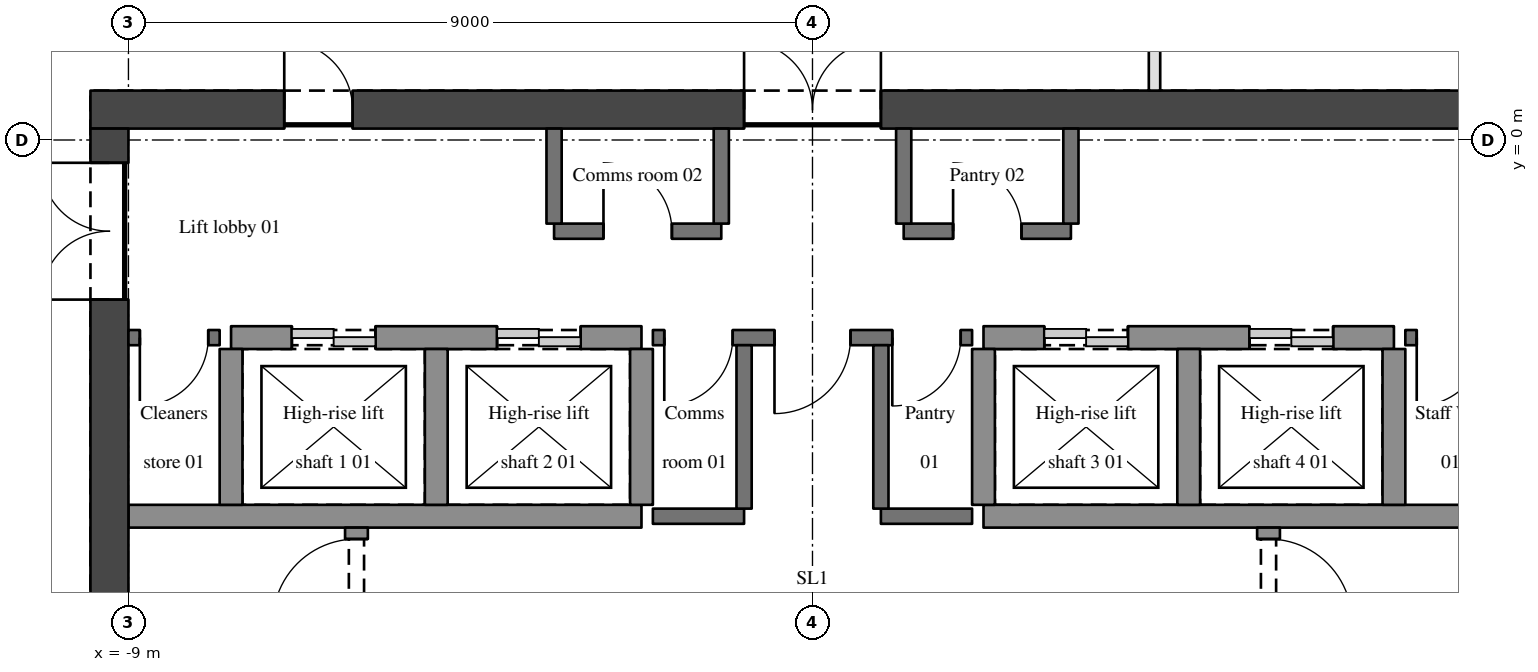
"""IFC4 building model, lengths in metres.
Left out: names, types, materials, properties, quantities, classifications, styles, units other than length and angle.
Written with IfcOpenShell. Run it as: python <this file> out.ifc"""

import sys

from ifc_helpers import new_model, si_unit, direction, frame, frame_2d, origin, place, context, subcontext, project, spatial, rectangle, extrude, element, fill, save


model = new_model("IFC4")
c1 = context("Model", 3, precision=1e-05, world=origin(), true_north=direction((0.0, 1.0)))
c2 = subcontext(c1, "Body", "Model", "MODEL_VIEW")
j1 = project(units=[si_unit("LENGTHUNIT", "METRE"), si_unit("PLANEANGLEUNIT", "RADIAN")], contexts=[c1])
p1 = place(None, origin())
s1 = spatial("IfcSite", under=j1, at=p1, CompositionType="ELEMENT")
p2 = place(p1, origin())
s2 = spatial("IfcBuilding", under=s1, at=p2, CompositionType="ELEMENT")
p3 = place(p2, frame((0.0, 0.0, 251.85)))
s3 = spatial("IfcBuildingStorey", under=s2, at=p3, CompositionType="ELEMENT", Elevation=251.85)
p4 = place(p3, frame((-9.5, 0.4, 0.0), z_axis=(0.0, 0.0, 1.0), x_axis=(1.0, 0.0, 0.0)))
e1 = element("IfcWall", 1, at=p4, inside=s3, PredefinedType="SHEAR", context=c2, shape_type="SweptSolid", body=[
    extrude(rectangle(XDim=19.0, YDim=0.5, at=frame_2d((9.5, 0.0))), origin(), (0.0, 0.0, 1.0), 3.15),
])
p5 = place(p4, frame((8.6, 0.0, 0.0)))
e2 = element("IfcOpeningElement", 2, at=p5, cuts=e1, PredefinedType="OPENING", context=c2, shape_type="SweptSolid", body=[
    extrude(rectangle(XDim=1.8, YDim=2.1, at=frame_2d((0.9, 1.05))), frame((0.0, 0.26, 0.0), z_axis=(0.0, -1.0, 0.0), x_axis=(1.0, 0.0, 0.0)), (0.0, 0.0, 1.0), 0.52),
])
p6 = place(p4, frame((2.55, 0.0, 0.0)))
e3 = element("IfcOpeningElement", 3, at=p6, cuts=e1, PredefinedType="OPENING", context=c2, shape_type="SweptSolid", body=[
    extrude(rectangle(XDim=0.9, YDim=2.1, at=frame_2d((0.45, 1.05))), frame((0.0, 0.26, 0.0), z_axis=(0.0, -1.0, 0.0), x_axis=(1.0, 0.0, 0.0)), (0.0, 0.0, 1.0), 0.52),
])
p7 = place(p3, frame((-9.25, -11.5, 0.0), z_axis=(0.0, 0.0, 1.0), x_axis=(0.0, 1.0, 0.0)))
e4 = element("IfcWall", 4, at=p7, inside=s3, PredefinedType="SHEAR", context=c2, shape_type="SweptSolid", body=[
    extrude(rectangle(XDim=11.65, YDim=0.5, at=frame_2d((5.825, 0.0))), origin(), (0.0, 0.0, 1.0), 3.15),
])
p8 = place(p7, frame((9.4, 0.0, 0.0)))
e5 = element("IfcOpeningElement", 5, at=p8, cuts=e4, PredefinedType="OPENING", context=c2, shape_type="SweptSolid", body=[
    extrude(rectangle(XDim=1.8, YDim=2.1, at=frame_2d((0.9, 1.05))), frame((0.0, 0.26, 0.0), z_axis=(0.0, -1.0, 0.0), x_axis=(1.0, 0.0, 0.0)), (0.0, 0.0, 1.0), 0.52),
])
p9 = place(p3, frame((-9.0, -4.95, 0.0), z_axis=(0.0, 0.0, 1.0), x_axis=(1.0, 0.0, 0.0)))
e6 = element("IfcWall", 6, at=p9, inside=s3, PredefinedType="SHEAR", context=c2, shape_type="SweptSolid", body=[
    extrude(rectangle(XDim=6.75, YDim=0.3, at=frame_2d((3.375, 0.0))), origin(), (0.0, 0.0, 1.0), 3.15),
])
for number, where, z_axis, x_axis in (
    (7, (-2.1, -4.95, 0.0), (0.0, 0.0, 1.0), (1.0, 0.0, 0.0)),
    (8, (0.9, -4.95, 0.0), (0.0, 0.0, 1.0), (1.0, 0.0, 0.0)),
):
    element("IfcWall", number, at=place(p3, frame(where, z_axis=z_axis, x_axis=x_axis)), inside=s3, PredefinedType="SOLIDWALL", context=c2, shape_type="SweptSolid", body=[
        extrude(rectangle(XDim=1.2, YDim=0.2, at=frame_2d((0.6, 0.0))), origin(), (0.0, 0.0, 1.0), 2.85),
    ])
p10 = place(p3, frame((2.25, -4.95, 0.0), z_axis=(0.0, 0.0, 1.0), x_axis=(1.0, 0.0, 0.0)))
e9 = element("IfcWall", 9, at=p10, inside=s3, PredefinedType="SHEAR", context=c2, shape_type="SweptSolid", body=[
    extrude(rectangle(XDim=6.75, YDim=0.3, at=frame_2d((3.375, 0.0))), origin(), (0.0, 0.0, 1.0), 3.15),
])
p11 = place(p3, frame((-7.8, -2.6, 0.0), z_axis=(0.0, 0.0, 1.0), x_axis=(-1.0, 0.0, 0.0)))
e10 = element("IfcWall", 10, at=p11, inside=s3, PredefinedType="SOLIDWALL", context=c2, shape_type="SweptSolid", body=[
    extrude(rectangle(XDim=1.2, YDim=0.2, at=frame_2d((0.6, 0.0))), origin(), (0.0, 0.0, 1.0), 2.85),
])
p12 = place(p11, frame((0.15, 0.0, 0.0)))
e11 = element("IfcOpeningElement", 11, at=p12, cuts=e10, PredefinedType="OPENING", context=c2, shape_type="SweptSolid", body=[
    extrude(rectangle(XDim=0.9, YDim=2.1, at=frame_2d((0.45, 1.05))), frame((0.0, 0.11, 0.0), z_axis=(0.0, -1.0, 0.0), x_axis=(1.0, 0.0, 0.0)), (0.0, 0.0, 1.0), 0.22),
])
p13 = place(p3, frame((-7.65, -2.6, 0.0), z_axis=(0.0, 0.0, 1.0), x_axis=(1.0, 0.0, 0.0)))
e12 = element("IfcWall", 12, at=p13, inside=s3, PredefinedType="SHEAR", context=c2, shape_type="SweptSolid", body=[
    extrude(rectangle(XDim=5.4, YDim=0.3, at=frame_2d((2.7, 0.0))), origin(), (0.0, 0.0, 1.0), 3.15),
])
p14 = place(p13, frame((0.8, 0.0, 0.0)))
e13 = element("IfcOpeningElement", 13, at=p14, cuts=e12, PredefinedType="OPENING", context=c2, shape_type="SweptSolid", body=[
    extrude(rectangle(XDim=1.1, YDim=2.1, at=frame_2d((0.55, 1.05))), frame((0.0, 0.16, 0.0), z_axis=(0.0, -1.0, 0.0), x_axis=(1.0, 0.0, 0.0)), (0.0, 0.0, 1.0), 0.32),
])
p15 = place(p13, frame((3.5, 0.0, 0.0)))
e14 = element("IfcOpeningElement", 14, at=p15, cuts=e12, PredefinedType="OPENING", context=c2, shape_type="SweptSolid", body=[
    extrude(rectangle(XDim=1.1, YDim=2.1, at=frame_2d((0.55, 1.05))), frame((0.0, 0.16, 0.0), z_axis=(0.0, -1.0, 0.0), x_axis=(1.0, 0.0, 0.0)), (0.0, 0.0, 1.0), 0.32),
])
p16 = place(p3, frame((2.1, -2.6, 0.0), z_axis=(0.0, 0.0, 1.0), x_axis=(-1.0, 0.0, 0.0)))
e15 = element("IfcWall", 15, at=p16, inside=s3, PredefinedType="SOLIDWALL", context=c2, shape_type="SweptSolid", body=[
    extrude(rectangle(XDim=4.2, YDim=0.2, at=frame_2d((2.1, 0.0))), origin(), (0.0, 0.0, 1.0), 2.85),
])
p17 = place(p16, frame((1.6, 0.0, 0.0)))
e16 = element("IfcOpeningElement", 16, at=p17, cuts=e15, PredefinedType="OPENING", context=c2, shape_type="SweptSolid", body=[
    extrude(rectangle(XDim=1.0, YDim=2.1, at=frame_2d((0.5, 1.05))), frame((0.0, 0.11, 0.0), z_axis=(0.0, -1.0, 0.0), x_axis=(1.0, 0.0, 0.0)), (0.0, 0.0, 1.0), 0.22),
])
p18 = place(p16, frame((3.15, 0.0, 0.0)))
e17 = element("IfcOpeningElement", 17, at=p18, cuts=e15, PredefinedType="OPENING", context=c2, shape_type="SweptSolid", body=[
    extrude(rectangle(XDim=0.9, YDim=2.1, at=frame_2d((0.45, 1.05))), frame((0.0, 0.11, 0.0), z_axis=(0.0, -1.0, 0.0), x_axis=(1.0, 0.0, 0.0)), (0.0, 0.0, 1.0), 0.22),
])
p19 = place(p16, frame((0.15, 0.0, 0.0)))
e18 = element("IfcOpeningElement", 18, at=p19, cuts=e15, PredefinedType="OPENING", context=c2, shape_type="SweptSolid", body=[
    extrude(rectangle(XDim=0.9, YDim=2.1, at=frame_2d((0.45, 1.05))), frame((0.0, 0.11, 0.0), z_axis=(0.0, -1.0, 0.0), x_axis=(1.0, 0.0, 0.0)), (0.0, 0.0, 1.0), 0.22),
])
p20 = place(p3, frame((2.25, -2.6, 0.0), z_axis=(0.0, 0.0, 1.0), x_axis=(1.0, 0.0, 0.0)))
e19 = element("IfcWall", 19, at=p20, inside=s3, PredefinedType="SHEAR", context=c2, shape_type="SweptSolid", body=[
    extrude(rectangle(XDim=5.4, YDim=0.3, at=frame_2d((2.7, 0.0))), origin(), (0.0, 0.0, 1.0), 3.15),
])
p21 = place(p20, frame((0.8, 0.0, 0.0)))
e20 = element("IfcOpeningElement", 20, at=p21, cuts=e19, PredefinedType="OPENING", context=c2, shape_type="SweptSolid", body=[
    extrude(rectangle(XDim=1.1, YDim=2.1, at=frame_2d((0.55, 1.05))), frame((0.0, 0.16, 0.0), z_axis=(0.0, -1.0, 0.0), x_axis=(1.0, 0.0, 0.0)), (0.0, 0.0, 1.0), 0.32),
])
p22 = place(p20, frame((3.5, 0.0, 0.0)))
e21 = element("IfcOpeningElement", 21, at=p22, cuts=e19, PredefinedType="OPENING", context=c2, shape_type="SweptSolid", body=[
    extrude(rectangle(XDim=1.1, YDim=2.1, at=frame_2d((0.55, 1.05))), frame((0.0, 0.16, 0.0), z_axis=(0.0, -1.0, 0.0), x_axis=(1.0, 0.0, 0.0)), (0.0, 0.0, 1.0), 0.32),
])
p23 = place(p3, frame((9.0, -2.6, 0.0), z_axis=(0.0, 0.0, 1.0), x_axis=(-1.0, 0.0, 0.0)))
e22 = element("IfcWall", 22, at=p23, inside=s3, PredefinedType="SOLIDWALL", context=c2, shape_type="SweptSolid", body=[
    extrude(rectangle(XDim=1.2, YDim=0.2, at=frame_2d((0.6, 0.0))), origin(), (0.0, 0.0, 1.0), 2.85),
])
p24 = place(p23, frame((0.15, 0.0, 0.0)))
e23 = element("IfcOpeningElement", 23, at=p24, cuts=e22, PredefinedType="OPENING", context=c2, shape_type="SweptSolid", body=[
    extrude(rectangle(XDim=0.9, YDim=2.1, at=frame_2d((0.45, 1.05))), frame((0.0, 0.11, 0.0), z_axis=(0.0, -1.0, 0.0), x_axis=(1.0, 0.0, 0.0)), (0.0, 0.0, 1.0), 0.22),
])
p25 = place(p3, frame((-3.4, -1.2, 0.0), z_axis=(0.0, 0.0, 1.0), x_axis=(1.0, 0.0, 0.0)))
e24 = element("IfcWall", 24, at=p25, inside=s3, PredefinedType="SOLIDWALL", context=c2, shape_type="SweptSolid", body=[
    extrude(rectangle(XDim=2.2, YDim=0.2, at=frame_2d((1.1, 0.0))), origin(), (0.0, 0.0, 1.0), 2.85),
])
p26 = place(p25, frame((0.65, 0.0, 0.0)))
e25 = element("IfcOpeningElement", 25, at=p26, cuts=e24, PredefinedType="OPENING", context=c2, shape_type="SweptSolid", body=[
    extrude(rectangle(XDim=0.9, YDim=2.1, at=frame_2d((0.45, 1.05))), frame((0.0, 0.11, 0.0), z_axis=(0.0, -1.0, 0.0), x_axis=(1.0, 0.0, 0.0)), (0.0, 0.0, 1.0), 0.22),
])
p27 = place(p3, frame((1.2, -1.2, 0.0), z_axis=(0.0, 0.0, 1.0), x_axis=(1.0, 0.0, 0.0)))
e26 = element("IfcWall", 26, at=p27, inside=s3, PredefinedType="SOLIDWALL", context=c2, shape_type="SweptSolid", body=[
    extrude(rectangle(XDim=2.2, YDim=0.2, at=frame_2d((1.1, 0.0))), origin(), (0.0, 0.0, 1.0), 2.85),
])
p28 = place(p27, frame((0.65, 0.0, 0.0)))
e27 = element("IfcOpeningElement", 27, at=p28, cuts=e26, PredefinedType="OPENING", context=c2, shape_type="SweptSolid", body=[
    extrude(rectangle(XDim=0.9, YDim=2.1, at=frame_2d((0.45, 1.05))), frame((0.0, 0.11, 0.0), z_axis=(0.0, -1.0, 0.0), x_axis=(1.0, 0.0, 0.0)), (0.0, 0.0, 1.0), 0.22),
])
p29 = place(p3, frame((-7.65, -4.8, 0.0), z_axis=(0.0, 0.0, 1.0), x_axis=(0.0, 1.0, 0.0)))
e28 = element("IfcWall", 28, at=p29, inside=s3, PredefinedType="SHEAR", context=c2, shape_type="SweptSolid", body=[
    extrude(rectangle(XDim=2.05, YDim=0.3, at=frame_2d((1.025, 0.0))), origin(), (0.0, 0.0, 1.0), 3.15),
])
p30 = place(p3, frame((-6.0, -11.5, 0.0), z_axis=(0.0, 0.0, 1.0), x_axis=(0.0, 1.0, 0.0)))
e29 = element("IfcWall", 29, at=p30, inside=s3, PredefinedType="SHEAR", context=c2, shape_type="SweptSolid", body=[
    extrude(rectangle(XDim=6.4, YDim=0.3, at=frame_2d((3.2, 0.0))), origin(), (0.0, 0.0, 1.0), 3.15),
])
p31 = place(p30, frame((5.15, 0.0, 0.0)))
e30 = element("IfcOpeningElement", 30, at=p31, cuts=e29, PredefinedType="OPENING", context=c2, shape_type="SweptSolid", body=[
    extrude(rectangle(XDim=1.1, YDim=2.1, at=frame_2d((0.55, 1.05))), frame((0.0, 0.16, 0.0), z_axis=(0.0, -1.0, 0.0), x_axis=(1.0, 0.0, 0.0)), (0.0, 0.0, 1.0), 0.32),
])
p32 = place(p3, frame((-4.95, -4.8, 0.0), z_axis=(0.0, 0.0, 1.0), x_axis=(0.0, 1.0, 0.0)))
e31 = element("IfcWall", 31, at=p32, inside=s3, PredefinedType="SHEAR", context=c2, shape_type="SweptSolid", body=[
    extrude(rectangle(XDim=2.05, YDim=0.3, at=frame_2d((1.025, 0.0))), origin(), (0.0, 0.0, 1.0), 3.15),
])
p33 = place(p3, frame((-3.4, -1.1, 0.0), z_axis=(0.0, 0.0, 1.0), x_axis=(0.0, 1.0, 0.0)))
e32 = element("IfcWall", 32, at=p33, inside=s3, PredefinedType="SOLIDWALL", context=c2, shape_type="SweptSolid", body=[
    extrude(rectangle(XDim=1.25, YDim=0.2, at=frame_2d((0.625, 0.0))), origin(), (0.0, 0.0, 1.0), 2.85),
])
p34 = place(p3, frame((-2.25, -4.8, 0.0), z_axis=(0.0, 0.0, 1.0), x_axis=(0.0, 1.0, 0.0)))
e33 = element("IfcWall", 33, at=p34, inside=s3, PredefinedType="SHEAR", context=c2, shape_type="SweptSolid", body=[
    extrude(rectangle(XDim=2.05, YDim=0.3, at=frame_2d((1.025, 0.0))), origin(), (0.0, 0.0, 1.0), 3.15),
])
p35 = place(p3, frame((-1.2, -1.1, 0.0), z_axis=(0.0, 0.0, 1.0), x_axis=(0.0, 1.0, 0.0)))
e34 = element("IfcWall", 34, at=p35, inside=s3, PredefinedType="SOLIDWALL", context=c2, shape_type="SweptSolid", body=[
    extrude(rectangle(XDim=1.25, YDim=0.2, at=frame_2d((0.625, 0.0))), origin(), (0.0, 0.0, 1.0), 2.85),
])
for number, where, z_axis, x_axis in (
    (35, (-0.9, -4.85, 0.0), (0.0, 0.0, 1.0), (0.0, 1.0, 0.0)),
    (36, (0.9, -4.85, 0.0), (0.0, 0.0, 1.0), (0.0, 1.0, 0.0)),
):
    element("IfcWall", number, at=place(p3, frame(where, z_axis=z_axis, x_axis=x_axis)), inside=s3, PredefinedType="SOLIDWALL", context=c2, shape_type="SweptSolid", body=[
        extrude(rectangle(XDim=2.15, YDim=0.2, at=frame_2d((1.075, 0.0))), origin(), (0.0, 0.0, 1.0), 2.85),
    ])
p36 = place(p3, frame((1.2, -1.1, 0.0), z_axis=(0.0, 0.0, 1.0), x_axis=(0.0, 1.0, 0.0)))
e37 = element("IfcWall", 37, at=p36, inside=s3, PredefinedType="SOLIDWALL", context=c2, shape_type="SweptSolid", body=[
    extrude(rectangle(XDim=1.25, YDim=0.2, at=frame_2d((0.625, 0.0))), origin(), (0.0, 0.0, 1.0), 2.85),
])
p37 = place(p3, frame((2.25, -4.8, 0.0), z_axis=(0.0, 0.0, 1.0), x_axis=(0.0, 1.0, 0.0)))
e38 = element("IfcWall", 38, at=p37, inside=s3, PredefinedType="SHEAR", context=c2, shape_type="SweptSolid", body=[
    extrude(rectangle(XDim=2.05, YDim=0.3, at=frame_2d((1.025, 0.0))), origin(), (0.0, 0.0, 1.0), 3.15),
])
p38 = place(p3, frame((3.4, -1.1, 0.0), z_axis=(0.0, 0.0, 1.0), x_axis=(0.0, 1.0, 0.0)))
e39 = element("IfcWall", 39, at=p38, inside=s3, PredefinedType="SOLIDWALL", context=c2, shape_type="SweptSolid", body=[
    extrude(rectangle(XDim=1.25, YDim=0.2, at=frame_2d((0.625, 0.0))), origin(), (0.0, 0.0, 1.0), 2.85),
])
p39 = place(p3, frame((4.5, 5.325, 0.0), z_axis=(0.0, 0.0, 1.0), x_axis=(0.0, -1.0, 0.0)))
e40 = element("IfcWall", 40, at=p39, inside=s3, PredefinedType="PARTITIONING", context=c2, shape_type="SweptSolid", body=[
    extrude(rectangle(XDim=4.675, YDim=0.15, at=frame_2d((2.337, 0.0))), origin(), (0.0, 0.0, 1.0), 2.21),
])
p40 = place(p39, frame((1.85, 0.0, 0.0)))
e41 = element("IfcOpeningElement", 41, at=p40, cuts=e40, PredefinedType="OPENING", context=c2, shape_type="SweptSolid", body=[
    extrude(rectangle(XDim=0.9, YDim=2.1, at=frame_2d((0.45, 1.05))), frame((0.0, 0.085, 0.0), z_axis=(0.0, -1.0, 0.0), x_axis=(1.0, 0.0, 0.0)), (0.0, 0.0, 1.0), 0.17),
])
p41 = place(p3, frame((4.95, -4.8, 0.0), z_axis=(0.0, 0.0, 1.0), x_axis=(0.0, 1.0, 0.0)))
e42 = element("IfcWall", 42, at=p41, inside=s3, PredefinedType="SHEAR", context=c2, shape_type="SweptSolid", body=[
    extrude(rectangle(XDim=2.05, YDim=0.3, at=frame_2d((1.025, 0.0))), origin(), (0.0, 0.0, 1.0), 3.15),
])
p42 = place(p3, frame((6.0, -5.1, 0.0), z_axis=(0.0, 0.0, 1.0), x_axis=(0.0, -1.0, 0.0)))
e43 = element("IfcWall", 43, at=p42, inside=s3, PredefinedType="SHEAR", context=c2, shape_type="SweptSolid", body=[
    extrude(rectangle(XDim=6.4, YDim=0.3, at=frame_2d((3.2, 0.0))), origin(), (0.0, 0.0, 1.0), 3.15),
])
p43 = place(p42, frame((0.15, 0.0, 0.0)))
e44 = element("IfcOpeningElement", 44, at=p43, cuts=e43, PredefinedType="OPENING", context=c2, shape_type="SweptSolid", body=[
    extrude(rectangle(XDim=1.1, YDim=2.1, at=frame_2d((0.55, 1.05))), frame((0.0, 0.16, 0.0), z_axis=(0.0, -1.0, 0.0), x_axis=(1.0, 0.0, 0.0)), (0.0, 0.0, 1.0), 0.32),
])
p44 = place(p3, frame((7.65, -4.8, 0.0), z_axis=(0.0, 0.0, 1.0), x_axis=(0.0, 1.0, 0.0)))
e45 = element("IfcWall", 45, at=p44, inside=s3, PredefinedType="SHEAR", context=c2, shape_type="SweptSolid", body=[
    extrude(rectangle(XDim=2.05, YDim=0.3, at=frame_2d((1.025, 0.0))), origin(), (0.0, 0.0, 1.0), 3.15),
])
p45 = place(p8, origin())
e46 = element("IfcDoor", 46, at=p45, inside=s3, OperationType="DOUBLE_DOOR_SINGLE_SWING", PredefinedType="DOOR", context=c2, shape_type="SweptSolid", body=[
    extrude(rectangle(XDim=1.8, YDim=2.1, at=frame_2d((0.9, 1.05))), frame((0.0, 0.025, 0.0), z_axis=(0.0, -1.0, 0.0), x_axis=(1.0, 0.0, 0.0)), (0.0, 0.0, 1.0), 0.05),
])
fill(e5, e46)
p46 = place(p5, origin())
e47 = element("IfcDoor", 47, at=p46, inside=s3, OperationType="DOUBLE_DOOR_SINGLE_SWING", PredefinedType="DOOR", context=c2, shape_type="SweptSolid", body=[
    extrude(rectangle(XDim=1.8, YDim=2.1, at=frame_2d((0.9, 1.05))), frame((0.0, 0.025, 0.0), z_axis=(0.0, -1.0, 0.0), x_axis=(1.0, 0.0, 0.0)), (0.0, 0.0, 1.0), 0.05),
])
fill(e2, e47)
p47 = place(p17, origin())
e48 = element("IfcDoor", 48, at=p47, inside=s3, OperationType="SINGLE_SWING_RIGHT", PredefinedType="DOOR", context=c2, shape_type="SweptSolid", body=[
    extrude(rectangle(XDim=1.0, YDim=2.1, at=frame_2d((0.5, 1.05))), frame((0.0, 0.025, 0.0), z_axis=(0.0, -1.0, 0.0), x_axis=(1.0, 0.0, 0.0)), (0.0, 0.0, 1.0), 0.05),
])
fill(e16, e48)
p48 = place(p31, origin())
e49 = element("IfcDoor", 49, at=p48, inside=s3, OperationType="SINGLE_SWING_LEFT", PredefinedType="DOOR", context=c2, shape_type="SweptSolid", body=[
    extrude(rectangle(XDim=1.1, YDim=2.1, at=frame_2d((0.55, 1.05))), frame((0.0, 0.025, 0.0), z_axis=(0.0, -1.0, 0.0), x_axis=(1.0, 0.0, 0.0)), (0.0, 0.0, 1.0), 0.05),
])
fill(e30, e49)
p49 = place(p43, origin())
e50 = element("IfcDoor", 50, at=p49, inside=s3, OperationType="SINGLE_SWING_RIGHT", PredefinedType="DOOR", context=c2, shape_type="SweptSolid", body=[
    extrude(rectangle(XDim=1.1, YDim=2.1, at=frame_2d((0.55, 1.05))), frame((0.0, 0.025, 0.0), z_axis=(0.0, -1.0, 0.0), x_axis=(1.0, 0.0, 0.0)), (0.0, 0.0, 1.0), 0.05),
])
fill(e44, e50)
p50 = place(p18, origin())
e51 = element("IfcDoor", 51, at=p50, inside=s3, OperationType="SINGLE_SWING_RIGHT", PredefinedType="DOOR", context=c2, shape_type="SweptSolid", body=[
    extrude(rectangle(XDim=0.9, YDim=2.1, at=frame_2d((0.45, 1.05))), frame((0.0, 0.025, 0.0), z_axis=(0.0, -1.0, 0.0), x_axis=(1.0, 0.0, 0.0)), (0.0, 0.0, 1.0), 0.05),
])
fill(e17, e51)
p51 = place(p19, origin())
e52 = element("IfcDoor", 52, at=p51, inside=s3, OperationType="SINGLE_SWING_RIGHT", PredefinedType="DOOR", context=c2, shape_type="SweptSolid", body=[
    extrude(rectangle(XDim=0.9, YDim=2.1, at=frame_2d((0.45, 1.05))), frame((0.0, 0.025, 0.0), z_axis=(0.0, -1.0, 0.0), x_axis=(1.0, 0.0, 0.0)), (0.0, 0.0, 1.0), 0.05),
])
fill(e18, e52)
p52 = place(p24, origin())
e53 = element("IfcDoor", 53, at=p52, inside=s3, OperationType="SINGLE_SWING_RIGHT", PredefinedType="DOOR", context=c2, shape_type="SweptSolid", body=[
    extrude(rectangle(XDim=0.9, YDim=2.1, at=frame_2d((0.45, 1.05))), frame((0.0, 0.025, 0.0), z_axis=(0.0, -1.0, 0.0), x_axis=(1.0, 0.0, 0.0)), (0.0, 0.0, 1.0), 0.05),
])
fill(e23, e53)
p53 = place(p12, origin())
e54 = element("IfcDoor", 54, at=p53, inside=s3, OperationType="SINGLE_SWING_RIGHT", PredefinedType="DOOR", context=c2, shape_type="SweptSolid", body=[
    extrude(rectangle(XDim=0.9, YDim=2.1, at=frame_2d((0.45, 1.05))), frame((0.0, 0.025, 0.0), z_axis=(0.0, -1.0, 0.0), x_axis=(1.0, 0.0, 0.0)), (0.0, 0.0, 1.0), 0.05),
])
fill(e11, e54)
p54 = place(p6, origin())
e55 = element("IfcDoor", 55, at=p54, inside=s3, OperationType="SINGLE_SWING_LEFT", PredefinedType="DOOR", context=c2, shape_type="SweptSolid", body=[
    extrude(rectangle(XDim=0.9, YDim=2.1, at=frame_2d((0.45, 1.05))), frame((0.0, 0.025, 0.0), z_axis=(0.0, -1.0, 0.0), x_axis=(1.0, 0.0, 0.0)), (0.0, 0.0, 1.0), 0.05),
])
fill(e3, e55)
p55 = place(p26, origin())
e56 = element("IfcDoor", 56, at=p55, inside=s3, OperationType="SINGLE_SWING_LEFT", PredefinedType="DOOR", context=c2, shape_type="SweptSolid", body=[
    extrude(rectangle(XDim=0.9, YDim=2.1, at=frame_2d((0.45, 1.05))), frame((0.0, 0.025, 0.0), z_axis=(0.0, -1.0, 0.0), x_axis=(1.0, 0.0, 0.0)), (0.0, 0.0, 1.0), 0.05),
])
fill(e25, e56)
p56 = place(p28, origin())
e57 = element("IfcDoor", 57, at=p56, inside=s3, OperationType="SINGLE_SWING_LEFT", PredefinedType="DOOR", context=c2, shape_type="SweptSolid", body=[
    extrude(rectangle(XDim=0.9, YDim=2.1, at=frame_2d((0.45, 1.05))), frame((0.0, 0.025, 0.0), z_axis=(0.0, -1.0, 0.0), x_axis=(1.0, 0.0, 0.0)), (0.0, 0.0, 1.0), 0.05),
])
fill(e27, e57)
p57 = place(p14, origin())
e58 = element("IfcDoor", 58, at=p57, inside=s3, OperationType="DOUBLE_DOOR_SLIDING", PredefinedType="DOOR", context=c2, shape_type="SweptSolid", body=[
    extrude(rectangle(XDim=1.1, YDim=2.1, at=frame_2d((0.55, 1.05))), frame((0.0, 0.025, 0.0), z_axis=(0.0, -1.0, 0.0), x_axis=(1.0, 0.0, 0.0)), (0.0, 0.0, 1.0), 0.05),
])
fill(e13, e58)
p58 = place(p15, origin())
e59 = element("IfcDoor", 59, at=p58, inside=s3, OperationType="DOUBLE_DOOR_SLIDING", PredefinedType="DOOR", context=c2, shape_type="SweptSolid", body=[
    extrude(rectangle(XDim=1.1, YDim=2.1, at=frame_2d((0.55, 1.05))), frame((0.0, 0.025, 0.0), z_axis=(0.0, -1.0, 0.0), x_axis=(1.0, 0.0, 0.0)), (0.0, 0.0, 1.0), 0.05),
])
fill(e14, e59)
p59 = place(p21, origin())
e60 = element("IfcDoor", 60, at=p59, inside=s3, OperationType="DOUBLE_DOOR_SLIDING", PredefinedType="DOOR", context=c2, shape_type="SweptSolid", body=[
    extrude(rectangle(XDim=1.1, YDim=2.1, at=frame_2d((0.55, 1.05))), frame((0.0, 0.025, 0.0), z_axis=(0.0, -1.0, 0.0), x_axis=(1.0, 0.0, 0.0)), (0.0, 0.0, 1.0), 0.05),
])
fill(e20, e60)
p60 = place(p22, origin())
e61 = element("IfcDoor", 61, at=p60, inside=s3, OperationType="DOUBLE_DOOR_SLIDING", PredefinedType="DOOR", context=c2, shape_type="SweptSolid", body=[
    extrude(rectangle(XDim=1.1, YDim=2.1, at=frame_2d((0.55, 1.05))), frame((0.0, 0.025, 0.0), z_axis=(0.0, -1.0, 0.0), x_axis=(1.0, 0.0, 0.0)), (0.0, 0.0, 1.0), 0.05),
])
fill(e21, e61)
save(model, sys.argv[1])
